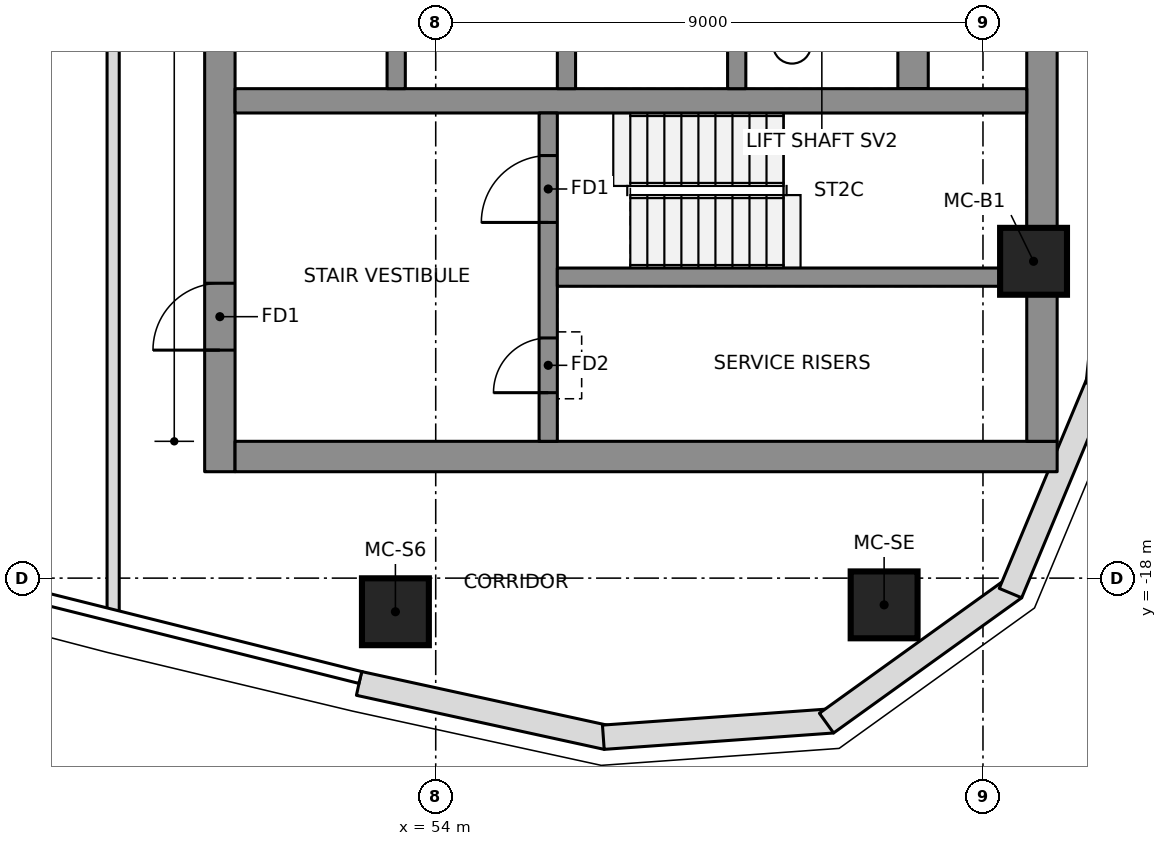
"""IFC4 building model, lengths in metres.
Left out: names, types, materials, properties, quantities, classifications, styles, units other than length and angle.
Written with IfcOpenShell. Run it as: python <this file> out.ifc"""

import sys

from ifc_helpers import new_model, si_unit, direction, frame, frame_2d, origin, origin_2d, place, context, subcontext, project, spatial, polyline, rectangle, outline, extrude, element, fill, save


model = new_model("IFC4")
c1 = context("Model", 3, precision=1e-05, world=origin(), true_north=direction((0.0, 1.0)))
c2 = subcontext(c1, "Body", "Model", "MODEL_VIEW")
j1 = project(units=[si_unit("LENGTHUNIT", "METRE"), si_unit("PLANEANGLEUNIT", "RADIAN")], contexts=[c1])
p1 = place(None, origin())
s1 = spatial("IfcSite", under=j1, at=p1, CompositionType="ELEMENT")
p2 = place(p1, origin())
s2 = spatial("IfcBuilding", under=s1, at=p2, CompositionType="ELEMENT")
p3 = place(p2, frame((0.0, 0.0, 299.85)))
s3 = spatial("IfcBuildingStorey", under=s2, at=p3, CompositionType="ELEMENT", Elevation=299.85)
p4 = place(p3, frame((50.45, -16.25, 0.0), z_axis=(0.0, 0.0, 1.0), x_axis=(0.0, 1.0, 0.0)))
e1 = element("IfcWall", 1, at=p4, inside=s3, PredefinedType="SHEAR", context=c2, shape_type="SweptSolid", body=[
    extrude(rectangle(XDim=9.6, YDim=0.5, at=frame_2d((4.8, 0.0))), origin(), (0.0, 0.0, 1.0), 3.55),
])
p5 = place(p4, frame((2.0, 0.0, 0.0)))
e2 = element("IfcOpeningElement", 2, at=p5, cuts=e1, PredefinedType="OPENING", context=c2, shape_type="SweptSolid", body=[
    extrude(rectangle(XDim=1.1, YDim=2.1, at=frame_2d((0.55, 1.05))), frame((0.0, 0.26, 0.0), z_axis=(0.0, -1.0, 0.0), x_axis=(1.0, 0.0, 0.0)), (0.0, 0.0, 1.0), 0.52),
])
p6 = place(p3, frame((50.7, -16.0, 0.0), z_axis=(0.0, 0.0, 1.0), x_axis=(1.0, 0.0, 0.0)))
e3 = element("IfcWall", 3, at=p6, inside=s3, PredefinedType="SHEAR", context=c2, shape_type="SweptSolid", body=[
    extrude(rectangle(XDim=13.52, YDim=0.5, at=frame_2d((6.76, 0.0))), origin(), (0.0, 0.0, 1.0), 3.55),
])
p7 = place(p3, frame((63.97, -15.75, 0.0), z_axis=(0.0, 0.0, 1.0), x_axis=(0.0, 1.0, 0.0)))
e4 = element("IfcWall", 4, at=p7, inside=s3, PredefinedType="SHEAR", context=c2, shape_type="SweptSolid", body=[
    extrude(rectangle(XDim=8.847, YDim=0.5, at=frame_2d((4.423, 0.0))), origin(), (0.0, 0.0, 1.0), 3.55),
])
p8 = place(p3, frame((61.85, -9.95, 0.0), z_axis=(0.0, 0.0, 1.0), x_axis=(0.0, 1.0, 0.0)))
e5 = element("IfcWall", 5, at=p8, inside=s3, PredefinedType="SHEAR", context=c2, shape_type="SweptSolid", body=[
    extrude(rectangle(XDim=19.9, YDim=0.5, at=frame_2d((9.95, 0.0))), origin(), (0.0, 0.0, 1.0), 3.55),
])
p9 = place(p3, frame((50.7, -10.15, 0.0), z_axis=(0.0, 0.0, 1.0), x_axis=(1.0, 0.0, 0.0)))
e6 = element("IfcWall", 6, at=p9, inside=s3, PredefinedType="SHEAR", context=c2, shape_type="SweptSolid", body=[
    extrude(rectangle(XDim=13.02, YDim=0.4, at=frame_2d((6.51, 0.0))), origin(), (0.0, 0.0, 1.0), 3.55),
])
for number, where, z_axis, x_axis in (
    (7, (53.35, -9.95, 0.0), (0.0, 0.0, 1.0), (0.0, 1.0, 0.0)),
    (8, (56.15, -9.95, 0.0), (0.0, 0.0, 1.0), (0.0, 1.0, 0.0)),
    (9, (58.95, -9.95, 0.0), (0.0, 0.0, 1.0), (0.0, 1.0, 0.0)),
):
    element("IfcWall", number, at=place(p3, frame(where, z_axis=z_axis, x_axis=x_axis)), inside=s3, PredefinedType="SHEAR", context=c2, shape_type="SweptSolid", body=[
        extrude(rectangle(XDim=3.0, YDim=0.3, at=frame_2d((1.5, 0.0))), origin(), (0.0, 0.0, 1.0), 3.55),
    ])
p10 = place(p3, frame((55.85, -15.75, 0.0), z_axis=(0.0, 0.0, 1.0), x_axis=(0.0, 1.0, 0.0)))
e10 = element("IfcWall", 10, at=p10, inside=s3, PredefinedType="SHEAR", context=c2, shape_type="SweptSolid", body=[
    extrude(rectangle(XDim=5.4, YDim=0.3, at=frame_2d((2.7, 0.0))), origin(), (0.0, 0.0, 1.0), 3.55),
])
p11 = place(p10, frame((3.6, 0.0, 0.0)))
e11 = element("IfcOpeningElement", 11, at=p11, cuts=e10, PredefinedType="OPENING", context=c2, shape_type="SweptSolid", body=[
    extrude(rectangle(XDim=1.1, YDim=2.1, at=frame_2d((0.55, 1.05))), frame((0.0, 0.16, 0.0), z_axis=(0.0, -1.0, 0.0), x_axis=(1.0, 0.0, 0.0)), (0.0, 0.0, 1.0), 0.32),
])
p12 = place(p10, frame((0.8, 0.0, 0.0)))
e12 = element("IfcOpeningElement", 12, at=p12, cuts=e10, PredefinedType="OPENING", context=c2, shape_type="SweptSolid", body=[
    extrude(rectangle(XDim=0.9, YDim=2.1, at=frame_2d((0.45, 1.05))), frame((0.0, 0.16, 0.0), z_axis=(0.0, -1.0, 0.0), x_axis=(1.0, 0.0, 0.0)), (0.0, 0.0, 1.0), 0.32),
])
p13 = place(p3, frame((56.0, -13.05, 0.0), z_axis=(0.0, 0.0, 1.0), x_axis=(1.0, 0.0, 0.0)))
e13 = element("IfcWall", 13, at=p13, inside=s3, PredefinedType="SHEAR", context=c2, shape_type="SweptSolid", body=[
    extrude(rectangle(XDim=7.72, YDim=0.3, at=frame_2d((3.86, 0.0))), origin(), (0.0, 0.0, 1.0), 3.55),
])
for number, where, z_axis, x_axis in (
    (14, (53.337, -18.553, 0.0), (0.0, 0.0, 1.0), (1.0, 0.0, 0.0)),
    (15, (61.374, -18.44, 0.0), (0.0, 0.0, 1.0), (1.0, 0.0, 0.0)),
    (16, (63.832, -12.789, 0.0), (0.0, 0.0, 1.0), (1.0, 0.0, 0.0)),
):
    element("IfcColumn", number, at=place(p3, frame(where, z_axis=z_axis, x_axis=x_axis)), inside=s3, PredefinedType="COLUMN", context=c2, shape_type="SweptSolid", body=[
        extrude(rectangle(XDim=1.1, YDim=1.1, at=origin_2d()), origin(), (0.0, 0.0, 1.0), 3.55),
    ])
p14 = place(p3, frame((52.738, -19.732, 0.0), z_axis=(0.0, 0.0, 1.0), x_axis=(0.977020225348, -0.213146614471, 0.0)))
e17 = element("IfcWall", 17, at=p14, inside=s3, PredefinedType="NOTDEFINED", context=c2, shape_type="SweptSolid", body=[
    extrude(outline(polyline([(0.0, -0.2), (4.171, -0.2), (4.113, 0.2), (0.0, 0.2), (0.0, -0.2)])), origin(), (0.0, 0.0, 1.0), 3.25),
])
p15 = place(p3, frame((56.785, -20.615, 0.0), z_axis=(0.0, 0.0, 1.0), x_axis=(0.99746272096, 0.071190731806, 0.0)))
e18 = element("IfcWall", 18, at=p15, inside=s3, PredefinedType="NOTDEFINED", context=c2, shape_type="SweptSolid", body=[
    extrude(outline(polyline([(-0.029, -0.2), (3.753, -0.2), (3.64, 0.2), (0.029, 0.2), (-0.029, -0.2)])), origin(), (0.0, 0.0, 1.0), 3.25),
])
p16 = place(p3, frame((60.472, -20.352, 0.0), z_axis=(0.0, 0.0, 1.0), x_axis=(0.811962548682, 0.583709533533, 0.0)))
e19 = element("IfcWall", 19, at=p16, inside=s3, PredefinedType="NOTDEFINED", context=c2, shape_type="SweptSolid", body=[
    extrude(outline(polyline([(-0.057, -0.2), (3.753, -0.2), (3.64, 0.2), (0.057, 0.2), (-0.057, -0.2)])), origin(), (0.0, 0.0, 1.0), 3.25),
])
p17 = place(p3, frame((63.474, -18.194, 0.0), z_axis=(0.0, 0.0, 1.0), x_axis=(0.385285857918, 0.922797273343, 0.0)))
e20 = element("IfcWall", 20, at=p17, inside=s3, PredefinedType="NOTDEFINED", context=c2, shape_type="SweptSolid", body=[
    extrude(outline(polyline([(-0.057, -0.2), (3.726, -0.2), (3.667, 0.2), (0.057, 0.2), (-0.057, -0.2)])), origin(), (0.0, 0.0, 1.0), 3.25),
])
p18 = place(p3, frame((64.898, -14.782, 0.0), z_axis=(0.0, 0.0, 1.0), x_axis=(0.102249826987, 0.994758751096, 0.0)))
e21 = element("IfcWall", 21, at=p18, inside=s3, PredefinedType="NOTDEFINED", context=c2, shape_type="SweptSolid", body=[
    extrude(outline(polyline([(-0.03, -0.2), (4.237, -0.2), (4.23, 0.2), (0.03, 0.2), (-0.03, -0.2)])), origin(), (0.0, 0.0, 1.0), 3.25),
])
p19 = place(p3, frame((48.695, -8.676, 0.0), z_axis=(0.0, 0.0, 1.0), x_axis=(0.0, -1.0, 0.0)))
e22 = element("IfcWall", 22, at=p19, inside=s3, PredefinedType="PARTITIONING", context=c2, shape_type="SweptSolid", body=[
    extrude(rectangle(XDim=9.877, YDim=0.2, at=frame_2d((4.938, 0.0))), origin(), (0.0, 0.0, 1.0), 3.15),
])
p20 = place(p11, origin())
e23 = element("IfcDoor", 23, at=p20, inside=s3, OperationType="SINGLE_SWING_RIGHT", PredefinedType="DOOR", context=c2, shape_type="SweptSolid", body=[
    extrude(rectangle(XDim=1.1, YDim=2.1, at=frame_2d((0.55, 1.05))), frame((0.0, 0.025, 0.0), z_axis=(0.0, -1.0, 0.0), x_axis=(1.0, 0.0, 0.0)), (0.0, 0.0, 1.0), 0.05),
])
fill(e11, e23)
p21 = place(p5, origin())
e24 = element("IfcDoor", 24, at=p21, inside=s3, OperationType="SINGLE_SWING_RIGHT", PredefinedType="DOOR", context=c2, shape_type="SweptSolid", body=[
    extrude(rectangle(XDim=1.1, YDim=2.1, at=frame_2d((0.55, 1.05))), frame((0.0, 0.025, 0.0), z_axis=(0.0, -1.0, 0.0), x_axis=(1.0, 0.0, 0.0)), (0.0, 0.0, 1.0), 0.05),
])
fill(e2, e24)
p22 = place(p12, origin())
e25 = element("IfcDoor", 25, at=p22, inside=s3, OperationType="SINGLE_SWING_LEFT", PredefinedType="DOOR", context=c2, shape_type="SweptSolid", body=[
    extrude(rectangle(XDim=0.9, YDim=2.1, at=frame_2d((0.45, 1.05))), frame((0.0, 0.025, 0.0), z_axis=(0.0, -1.0, 0.0), x_axis=(1.0, 0.0, 0.0)), (0.0, 0.0, 1.0), 0.05),
])
fill(e12, e25)
save(model, sys.argv[1])
